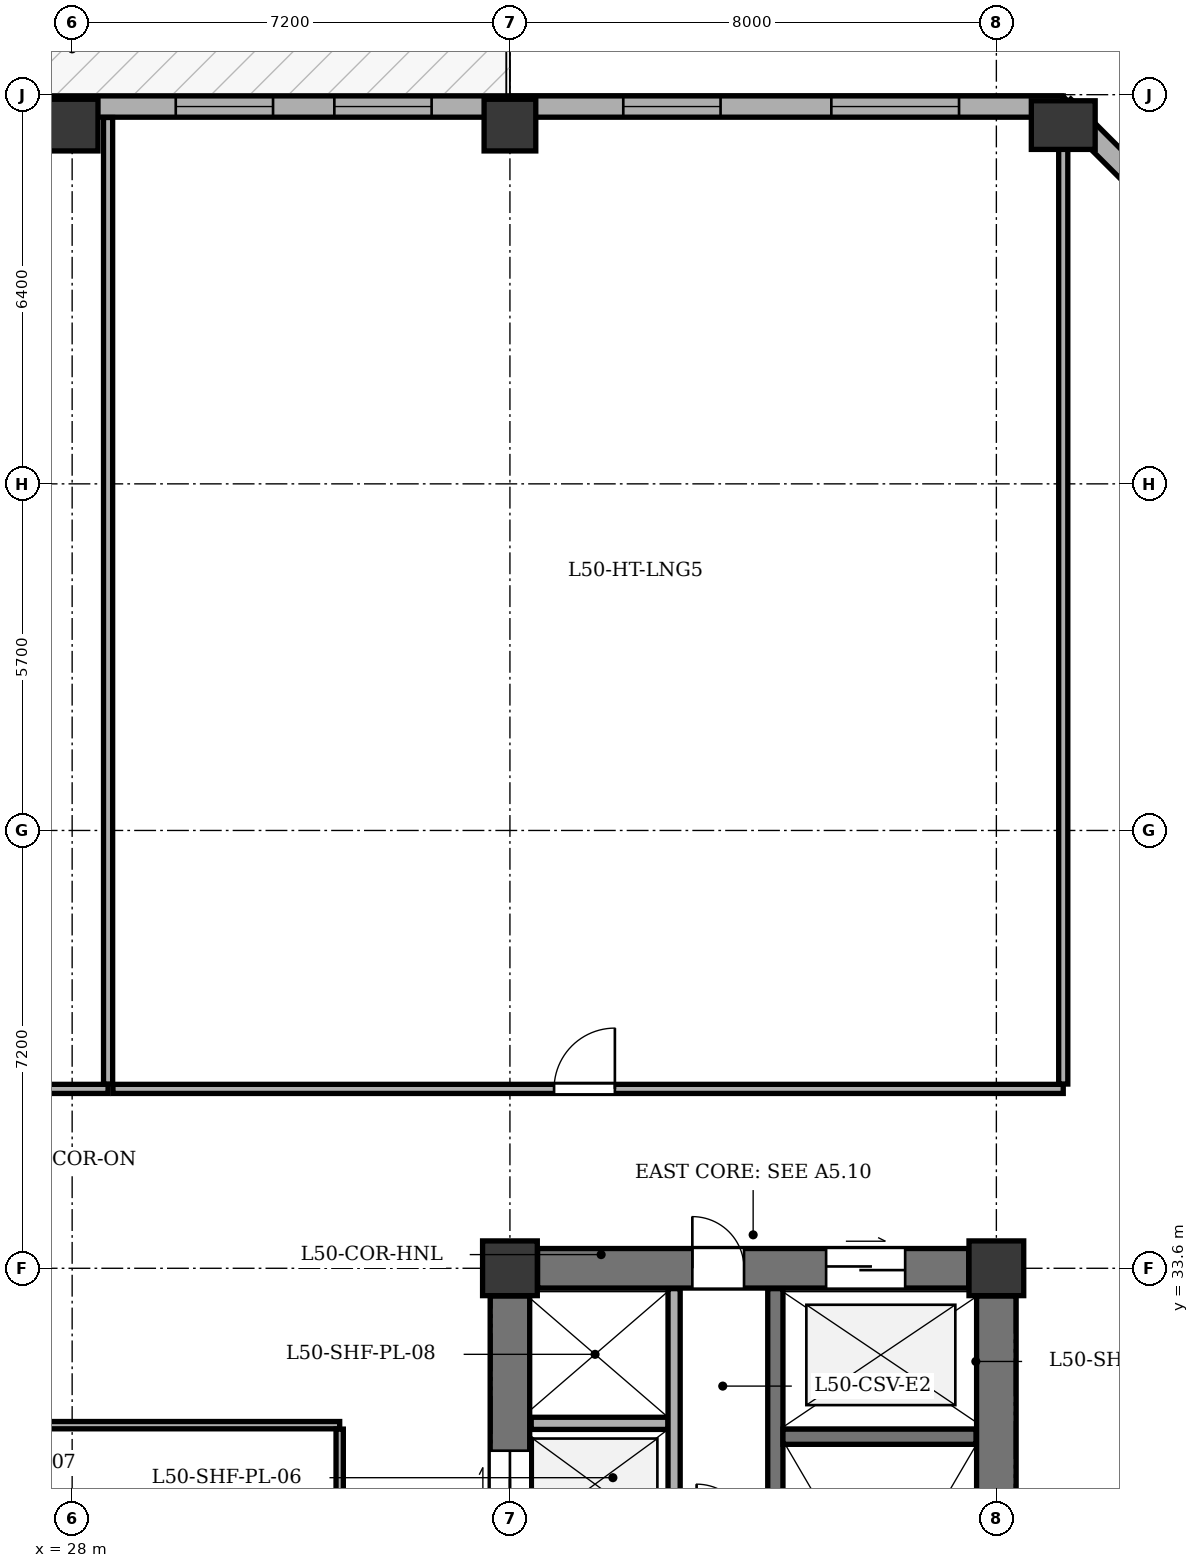
"""IFC4 building model, lengths in metres.
Left out: names, types, materials, properties, quantities, classifications, styles, units other than length and angle.
Written with IfcOpenShell. Run it as: python <this file> out.ifc"""

import sys

from ifc_helpers import new_model, si_unit, direction, frame, frame_2d, origin, origin_2d, place, context, subcontext, project, spatial, rectangle, extrude, element, fill, save


model = new_model("IFC4")
c1 = context("Model", 3, precision=1e-05, world=origin(), true_north=direction((0.0, 1.0)))
c2 = subcontext(c1, "Body", "Model", "MODEL_VIEW")
j1 = project(units=[si_unit("LENGTHUNIT", "METRE"), si_unit("PLANEANGLEUNIT", "RADIAN")], contexts=[c1])
p1 = place(None, origin())
s1 = spatial("IfcSite", under=j1, at=p1, CompositionType="ELEMENT")
p2 = place(p1, origin())
s2 = spatial("IfcBuilding", under=s1, at=p2, CompositionType="ELEMENT")
p3 = place(p2, frame((0.0, 0.0, 193.8)))
s3 = spatial("IfcBuildingStorey", under=s2, at=p3, CompositionType="ELEMENT", Elevation=193.8)
for number, where, z_axis, x_axis in (
    (1, (35.2, 33.6, 0.0), (0.0, 0.0, 1.0), (1.0, 0.0, 0.0)),
    (2, (43.2, 33.6, 0.0), (0.0, 0.0, 1.0), (1.0, 0.0, 0.0)),
):
    element("IfcColumn", number, at=place(p3, frame(where, z_axis=z_axis, x_axis=x_axis)), inside=s3, PredefinedType="COLUMN", context=c2, shape_type="SweptSolid", body=[
        extrude(rectangle(XDim=0.9, YDim=0.9, at=origin_2d()), origin(), (0.0, 0.0, 1.0), 3.5),
    ])
for number, where, z_axis, x_axis in (
    (3, (28.0, 52.4, 0.0), (0.0, 0.0, 1.0), (1.0, 0.0, 0.0)),
    (4, (35.2, 52.4, 0.0), (0.0, 0.0, 1.0), (1.0, 0.0, 0.0)),
):
    element("IfcColumn", number, at=place(p3, frame(where, z_axis=z_axis, x_axis=x_axis)), inside=s3, PredefinedType="COLUMN", context=c2, shape_type="SweptSolid", body=[
        extrude(rectangle(XDim=0.85, YDim=0.85, at=origin_2d()), origin(), (0.0, 0.0, 1.0), 3.5),
    ])
p4 = place(p3, frame((44.3, 52.4, 0.0), z_axis=(0.0, 0.0, 1.0), x_axis=(1.0, 0.0, 0.0)))
e5 = element("IfcColumn", 5, at=p4, inside=s3, PredefinedType="COLUMN", context=c2, shape_type="SweptSolid", body=[
    extrude(rectangle(XDim=0.8, YDim=1.05, at=origin_2d()), origin(), (0.0, 0.0, 1.0), 3.5),
])
p5 = place(p3, frame((9.3, 52.705, 0.0), z_axis=(0.0, 0.0, 1.0), x_axis=(1.0, 0.0, 0.0)))
e6 = element("IfcWall", 6, at=p5, inside=s3, PredefinedType="STANDARD", context=c2, shape_type="SweptSolid", body=[
    extrude(rectangle(XDim=35.0, YDim=0.35, at=frame_2d((17.5, 0.0))), origin(), (0.0, 0.0, 1.0), 2.635),
])
p6 = place(p5, frame((14.4, 0.0, 0.0)))
e7 = element("IfcOpeningElement", 7, at=p6, cuts=e6, PredefinedType="OPENING", context=c2, shape_type="SweptSolid", body=[
    extrude(rectangle(XDim=1.0, YDim=2.02, at=frame_2d((0.5, 1.01))), frame((0.0, 0.185, 0.0), z_axis=(0.0, -1.0, 0.0), x_axis=(1.0, 0.0, 0.0)), (0.0, 0.0, 1.0), 0.37),
])
p7 = place(p5, frame((2.687, 0.0, 0.75)))
e8 = element("IfcOpeningElement", 8, at=p7, cuts=e6, PredefinedType="OPENING", context=c2, shape_type="SweptSolid", body=[
    extrude(rectangle(XDim=1.6, YDim=1.75, at=frame_2d((0.8, 0.875))), frame((0.0, 0.185, 0.0), z_axis=(0.0, -1.0, 0.0), x_axis=(1.0, 0.0, 0.0)), (0.0, 0.0, 1.0), 0.37),
])
p8 = place(p5, frame((6.383, 0.0, 0.75)))
e9 = element("IfcOpeningElement", 9, at=p8, cuts=e6, PredefinedType="OPENING", context=c2, shape_type="SweptSolid", body=[
    extrude(rectangle(XDim=2.1, YDim=1.75, at=frame_2d((1.05, 0.875))), frame((0.0, 0.185, 0.0), z_axis=(0.0, -1.0, 0.0), x_axis=(1.0, 0.0, 0.0)), (0.0, 0.0, 1.0), 0.37),
])
p9 = place(p5, frame((20.404, 0.0, 0.75)))
e10 = element("IfcOpeningElement", 10, at=p9, cuts=e6, PredefinedType="OPENING", context=c2, shape_type="SweptSolid", body=[
    extrude(rectangle(XDim=1.6, YDim=1.75, at=frame_2d((0.8, 0.875))), frame((0.0, 0.185, 0.0), z_axis=(0.0, -1.0, 0.0), x_axis=(1.0, 0.0, 0.0)), (0.0, 0.0, 1.0), 0.37),
])
p10 = place(p5, frame((23.012, 0.0, 0.75)))
e11 = element("IfcOpeningElement", 11, at=p10, cuts=e6, PredefinedType="OPENING", context=c2, shape_type="SweptSolid", body=[
    extrude(rectangle(XDim=1.6, YDim=1.75, at=frame_2d((0.8, 0.875))), frame((0.0, 0.185, 0.0), z_axis=(0.0, -1.0, 0.0), x_axis=(1.0, 0.0, 0.0)), (0.0, 0.0, 1.0), 0.37),
])
p11 = place(p5, frame((27.764, 0.0, 0.75)))
e12 = element("IfcOpeningElement", 12, at=p11, cuts=e6, PredefinedType="OPENING", context=c2, shape_type="SweptSolid", body=[
    extrude(rectangle(XDim=1.6, YDim=1.75, at=frame_2d((0.8, 0.875))), frame((0.0, 0.185, 0.0), z_axis=(0.0, -1.0, 0.0), x_axis=(1.0, 0.0, 0.0)), (0.0, 0.0, 1.0), 0.37),
])
p12 = place(p5, frame((31.186, 0.0, 0.75)))
e13 = element("IfcOpeningElement", 13, at=p12, cuts=e6, PredefinedType="OPENING", context=c2, shape_type="SweptSolid", body=[
    extrude(rectangle(XDim=2.1, YDim=1.75, at=frame_2d((1.05, 0.875))), frame((0.0, 0.185, 0.0), z_axis=(0.0, -1.0, 0.0), x_axis=(1.0, 0.0, 0.0)), (0.0, 0.0, 1.0), 0.37),
])
p13 = place(p3, frame((44.3, 52.705, 0.0), z_axis=(0.0, 0.0, 1.0), x_axis=(0.707088817216, -0.7071247447, 0.0)))
e14 = element("IfcWall", 14, at=p13, inside=s3, PredefinedType="STANDARD", context=c2, shape_type="SweptSolid", body=[
    extrude(rectangle(XDim=6.795, YDim=0.35, at=frame_2d((3.398, 0.0))), origin(), (0.0, 0.0, 1.0), 2.635),
])
p14 = place(p13, frame((2.698, 0.0, 0.75)))
e15 = element("IfcOpeningElement", 15, at=p14, cuts=e14, PredefinedType="OPENING", context=c2, shape_type="SweptSolid", body=[
    extrude(rectangle(XDim=1.4, YDim=1.65, at=frame_2d((0.7, 0.825))), frame((0.0, 0.185, 0.0), z_axis=(0.0, -1.0, 0.0), x_axis=(1.0, 0.0, 0.0)), (0.0, 0.0, 1.0), 0.37),
])
p15 = place(p3, frame((43.2, 21.255, 0.0), z_axis=(0.0, 0.0, 1.0), x_axis=(0.0, 1.0, 0.0)))
e16 = element("IfcWall", 16, at=p15, inside=s3, PredefinedType="SHEAR", context=c2, shape_type="SweptSolid", body=[
    extrude(rectangle(XDim=11.89, YDim=0.65, at=frame_2d((5.945, 0.0))), origin(), (0.0, 0.0, 1.0), 3.05),
])
p16 = place(p3, frame((35.655, 33.6, 0.0), z_axis=(0.0, 0.0, 1.0), x_axis=(1.0, 0.0, 0.0)))
e17 = element("IfcWall", 17, at=p16, inside=s3, PredefinedType="SHEAR", context=c2, shape_type="SweptSolid", body=[
    extrude(rectangle(XDim=7.09, YDim=0.65, at=frame_2d((3.545, 0.0))), origin(), (0.0, 0.0, 1.0), 3.05),
])
p17 = place(p16, frame((4.745, 0.0, 0.0)))
e18 = element("IfcOpeningElement", 18, at=p17, cuts=e17, PredefinedType="OPENING", context=c2, shape_type="SweptSolid", body=[
    extrude(rectangle(XDim=1.3, YDim=2.15, at=frame_2d((0.65, 1.075))), frame((0.0, 0.335, 0.0), z_axis=(0.0, -1.0, 0.0), x_axis=(1.0, 0.0, 0.0)), (0.0, 0.0, 1.0), 0.67),
])
p18 = place(p16, frame((2.545, 0.0, 0.0)))
e19 = element("IfcOpeningElement", 19, at=p18, cuts=e17, PredefinedType="OPENING", context=c2, shape_type="SweptSolid", body=[
    extrude(rectangle(XDim=0.85, YDim=2.02, at=frame_2d((0.425, 1.01))), frame((0.0, 0.335, 0.0), z_axis=(0.0, -1.0, 0.0), x_axis=(1.0, 0.0, 0.0)), (0.0, 0.0, 1.0), 0.67),
])
p19 = place(p3, frame((35.2, 21.255, 0.0), z_axis=(0.0, 0.0, 1.0), x_axis=(0.0, 1.0, 0.0)))
e20 = element("IfcWall", 20, at=p19, inside=s3, PredefinedType="SHEAR", context=c2, shape_type="SweptSolid", body=[
    extrude(rectangle(XDim=11.89, YDim=0.65, at=frame_2d((5.945, 0.0))), origin(), (0.0, 0.0, 1.0), 3.05),
])
p20 = place(p19, frame((1.345, 0.0, 0.0)))
e21 = element("IfcOpeningElement", 21, at=p20, cuts=e20, PredefinedType="OPENING", context=c2, shape_type="SweptSolid", body=[
    extrude(rectangle(XDim=1.2, YDim=2.15, at=frame_2d((0.6, 1.075))), frame((0.0, 0.335, 0.0), z_axis=(0.0, -1.0, 0.0), x_axis=(1.0, 0.0, 0.0)), (0.0, 0.0, 1.0), 0.67),
])
p21 = place(p19, frame((4.345, 0.0, 0.0)))
e22 = element("IfcOpeningElement", 22, at=p21, cuts=e20, PredefinedType="OPENING", context=c2, shape_type="SweptSolid", body=[
    extrude(rectangle(XDim=1.1, YDim=2.1, at=frame_2d((0.55, 1.05))), frame((0.0, 0.335, 0.0), z_axis=(0.0, -1.0, 0.0), x_axis=(1.0, 0.0, 0.0)), (0.0, 0.0, 1.0), 0.67),
])
p22 = place(p19, frame((6.295, 0.0, 0.0)))
e23 = element("IfcOpeningElement", 23, at=p22, cuts=e20, PredefinedType="OPENING", context=c2, shape_type="SweptSolid", body=[
    extrude(rectangle(XDim=1.1, YDim=2.1, at=frame_2d((0.55, 1.05))), frame((0.0, 0.335, 0.0), z_axis=(0.0, -1.0, 0.0), x_axis=(1.0, 0.0, 0.0)), (0.0, 0.0, 1.0), 0.67),
])
p23 = place(p19, frame((8.245, 0.0, 0.0)))
e24 = element("IfcOpeningElement", 24, at=p23, cuts=e20, PredefinedType="OPENING", context=c2, shape_type="SweptSolid", body=[
    extrude(rectangle(XDim=1.1, YDim=2.1, at=frame_2d((0.55, 1.05))), frame((0.0, 0.335, 0.0), z_axis=(0.0, -1.0, 0.0), x_axis=(1.0, 0.0, 0.0)), (0.0, 0.0, 1.0), 0.67),
])
p24 = place(p3, frame((39.565, 21.135, 0.0), z_axis=(0.0, 0.0, 1.0), x_axis=(0.0, 1.0, 0.0)))
e25 = element("IfcWall", 25, at=p24, inside=s3, PredefinedType="SHEAR", context=c2, shape_type="SweptSolid", body=[
    extrude(rectangle(XDim=12.13, YDim=0.25, at=frame_2d((6.065, 0.0))), origin(), (0.0, 0.0, 1.0), 3.05),
])
p25 = place(p24, frame((0.515, 0.0, 0.0)))
e26 = element("IfcOpeningElement", 26, at=p25, cuts=e25, PredefinedType="OPENING", context=c2, shape_type="SweptSolid", body=[
    extrude(rectangle(XDim=1.2, YDim=2.15, at=frame_2d((0.6, 1.075))), frame((0.0, 0.135, 0.0), z_axis=(0.0, -1.0, 0.0), x_axis=(1.0, 0.0, 0.0)), (0.0, 0.0, 1.0), 0.27),
])
p26 = place(p24, frame((2.665, 0.0, 0.0)))
e27 = element("IfcOpeningElement", 27, at=p26, cuts=e25, PredefinedType="OPENING", context=c2, shape_type="SweptSolid", body=[
    extrude(rectangle(XDim=1.15, YDim=2.15, at=frame_2d((0.575, 1.075))), frame((0.0, 0.135, 0.0), z_axis=(0.0, -1.0, 0.0), x_axis=(1.0, 0.0, 0.0)), (0.0, 0.0, 1.0), 0.27),
])
p27 = place(p3, frame((39.69, 30.83, 0.0), z_axis=(0.0, 0.0, 1.0), x_axis=(1.0, 0.0, 0.0)))
e28 = element("IfcWall", 28, at=p27, inside=s3, PredefinedType="SHEAR", context=c2, shape_type="SweptSolid", body=[
    extrude(rectangle(XDim=3.175, YDim=0.25, at=frame_2d((1.587, 0.0))), origin(), (0.0, 0.0, 1.0), 3.05),
])
p28 = place(p3, frame((35.55, 31.05, 0.0), z_axis=(0.0, 0.0, 1.0), x_axis=(1.0, 0.0, 0.0)))
e29 = element("IfcWall", 29, at=p28, inside=s3, PredefinedType="SOLIDWALL", context=c2, shape_type="SweptSolid", body=[
    extrude(rectangle(XDim=2.25, YDim=0.2, at=frame_2d((1.125, 0.0))), origin(), (0.0, 0.0, 1.0), 3.05),
])
p29 = place(p3, frame((37.9, 25.27, 0.0), z_axis=(0.0, 0.0, 1.0), x_axis=(0.0, 1.0, 0.0)))
e30 = element("IfcWall", 30, at=p29, inside=s3, PredefinedType="SOLIDWALL", context=c2, shape_type="SweptSolid", body=[
    extrude(rectangle(XDim=7.995, YDim=0.2, at=frame_2d((3.998, 0.0))), origin(), (0.0, 0.0, 1.0), 3.05),
])
p30 = place(p3, frame((20.46, 31.02, 0.0), z_axis=(0.0, 0.0, 1.0), x_axis=(1.0, 0.0, 0.0)))
e31 = element("IfcWall", 31, at=p30, inside=s3, PredefinedType="PARTITIONING", context=c2, shape_type="SweptSolid", body=[
    extrude(rectangle(XDim=11.94, YDim=0.12, at=frame_2d((5.97, 0.0))), origin(), (0.0, 0.0, 1.0), 3.05),
])
p31 = place(p3, frame((32.4, 25.285, 0.0), z_axis=(0.0, 0.0, 1.0), x_axis=(0.0, 1.0, 0.0)))
e32 = element("IfcWall", 32, at=p31, inside=s3, PredefinedType="PARTITIONING", context=c2, shape_type="SweptSolid", body=[
    extrude(rectangle(XDim=5.67, YDim=0.12, at=frame_2d((2.835, 0.0))), origin(), (0.0, 0.0, 1.0), 3.05),
])
p32 = place(p31, frame((2.135, 0.0, 0.0)))
e33 = element("IfcOpeningElement", 33, at=p32, cuts=e32, PredefinedType="OPENING", context=c2, shape_type="SweptSolid", body=[
    extrude(rectangle(XDim=0.95, YDim=2.1, at=frame_2d((0.475, 1.05))), frame((0.0, 0.07, 0.0), z_axis=(0.0, -1.0, 0.0), x_axis=(1.0, 0.0, 0.0)), (0.0, 0.0, 1.0), 0.14),
])
p33 = place(p3, frame((21.27, 36.55, 0.0), z_axis=(0.0, 0.0, 1.0), x_axis=(1.0, 0.0, 0.0)))
e34 = element("IfcWall", 34, at=p33, inside=s3, PredefinedType="PARTITIONING", context=c2, shape_type="SweptSolid", body=[
    extrude(rectangle(XDim=7.321, YDim=0.15, at=frame_2d((3.661, 0.0))), origin(), (0.0, 0.0, 1.0), 3.05),
])
p34 = place(p33, frame((3.18, 0.0, 0.0)))
e35 = element("IfcOpeningElement", 35, at=p34, cuts=e34, PredefinedType="OPENING", context=c2, shape_type="SweptSolid", body=[
    extrude(rectangle(XDim=0.95, YDim=2.1, at=frame_2d((0.475, 1.05))), frame((0.0, 0.085, 0.0), z_axis=(0.0, -1.0, 0.0), x_axis=(1.0, 0.0, 0.0)), (0.0, 0.0, 1.0), 0.17),
])
p35 = place(p3, frame((28.591, 36.63, 0.0), z_axis=(0.0, 0.0, 1.0), x_axis=(0.0, 1.0, 0.0)))
e36 = element("IfcWall", 36, at=p35, inside=s3, PredefinedType="PARTITIONING", context=c2, shape_type="SweptSolid", body=[
    extrude(rectangle(XDim=15.895, YDim=0.15, at=frame_2d((7.948, 0.0))), origin(), (0.0, 0.0, 1.0), 3.05),
])
p36 = place(p3, frame((28.671, 36.55, 0.0), z_axis=(0.0, 0.0, 1.0), x_axis=(1.0, 0.0, 0.0)))
e37 = element("IfcWall", 37, at=p36, inside=s3, PredefinedType="PARTITIONING", context=c2, shape_type="SweptSolid", body=[
    extrude(rectangle(XDim=15.629, YDim=0.15, at=frame_2d((7.814, 0.0))), origin(), (0.0, 0.0, 1.0), 3.05),
])
p37 = place(p36, frame((7.255, 0.0, 0.0)))
e38 = element("IfcOpeningElement", 38, at=p37, cuts=e37, PredefinedType="OPENING", context=c2, shape_type="SweptSolid", body=[
    extrude(rectangle(XDim=1.0, YDim=2.1, at=frame_2d((0.5, 1.05))), frame((0.0, 0.085, 0.0), z_axis=(0.0, -1.0, 0.0), x_axis=(1.0, 0.0, 0.0)), (0.0, 0.0, 1.0), 0.17),
])
p38 = place(p3, frame((44.3, 36.63, 0.0), z_axis=(0.0, 0.0, 1.0), x_axis=(0.0, 1.0, 0.0)))
e39 = element("IfcWall", 39, at=p38, inside=s3, PredefinedType="PARTITIONING", context=c2, shape_type="SweptSolid", body=[
    extrude(rectangle(XDim=15.895, YDim=0.15, at=frame_2d((7.948, 0.0))), origin(), (0.0, 0.0, 1.0), 3.05),
])
p39 = place(p9, origin())
e40 = element("IfcWindow", 40, at=p39, inside=s3, PartitioningType="SINGLE_PANEL", PredefinedType="WINDOW", context=c2, shape_type="SweptSolid", body=[
    extrude(rectangle(XDim=1.6, YDim=1.75, at=frame_2d((0.8, 0.875))), frame((0.0, -0.01, 0.0), z_axis=(0.0, -1.0, 0.0), x_axis=(1.0, 0.0, 0.0)), (0.0, 0.0, 1.0), 0.06),
])
fill(e10, e40)
p40 = place(p10, origin())
e41 = element("IfcWindow", 41, at=p40, inside=s3, PartitioningType="SINGLE_PANEL", PredefinedType="WINDOW", context=c2, shape_type="SweptSolid", body=[
    extrude(rectangle(XDim=1.6, YDim=1.75, at=frame_2d((0.8, 0.875))), frame((0.0, -0.01, 0.0), z_axis=(0.0, -1.0, 0.0), x_axis=(1.0, 0.0, 0.0)), (0.0, 0.0, 1.0), 0.06),
])
fill(e11, e41)
p41 = place(p11, origin())
e42 = element("IfcWindow", 42, at=p41, inside=s3, PartitioningType="SINGLE_PANEL", PredefinedType="WINDOW", context=c2, shape_type="SweptSolid", body=[
    extrude(rectangle(XDim=1.6, YDim=1.75, at=frame_2d((0.8, 0.875))), frame((0.0, -0.01, 0.0), z_axis=(0.0, -1.0, 0.0), x_axis=(1.0, 0.0, 0.0)), (0.0, 0.0, 1.0), 0.06),
])
fill(e12, e42)
p42 = place(p12, origin())
e43 = element("IfcWindow", 43, at=p42, inside=s3, PartitioningType="SINGLE_PANEL", PredefinedType="WINDOW", context=c2, shape_type="SweptSolid", body=[
    extrude(rectangle(XDim=2.1, YDim=1.75, at=frame_2d((1.05, 0.875))), frame((0.0, -0.01, 0.0), z_axis=(0.0, -1.0, 0.0), x_axis=(1.0, 0.0, 0.0)), (0.0, 0.0, 1.0), 0.06),
])
fill(e13, e43)
p43 = place(p17, origin())
e44 = element("IfcDoor", 44, at=p43, inside=s3, OperationType="DOUBLE_DOOR_SLIDING", PredefinedType="DOOR", context=c2, shape_type="SweptSolid", body=[
    extrude(rectangle(XDim=1.3, YDim=2.15, at=frame_2d((0.65, 1.075))), frame((0.0, 0.025, 0.0), z_axis=(0.0, -1.0, 0.0), x_axis=(1.0, 0.0, 0.0)), (0.0, 0.0, 1.0), 0.05),
])
fill(e18, e44)
p44 = place(p18, origin())
e45 = element("IfcDoor", 45, at=p44, inside=s3, OperationType="SINGLE_SWING_LEFT", PredefinedType="DOOR", context=c2, shape_type="SweptSolid", body=[
    extrude(rectangle(XDim=0.85, YDim=2.02, at=frame_2d((0.425, 1.01))), frame((0.0, 0.025, 0.0), z_axis=(0.0, -1.0, 0.0), x_axis=(1.0, 0.0, 0.0)), (0.0, 0.0, 1.0), 0.05),
])
fill(e19, e45)
p45 = place(p23, origin())
e46 = element("IfcDoor", 46, at=p45, inside=s3, OperationType="DOUBLE_DOOR_SLIDING", PredefinedType="DOOR", context=c2, shape_type="SweptSolid", body=[
    extrude(rectangle(XDim=1.1, YDim=2.1, at=frame_2d((0.55, 1.05))), frame((0.0, 0.025, 0.0), z_axis=(0.0, -1.0, 0.0), x_axis=(1.0, 0.0, 0.0)), (0.0, 0.0, 1.0), 0.05),
])
fill(e24, e46)
p46 = place(p37, origin())
e47 = element("IfcDoor", 47, at=p46, inside=s3, OperationType="SINGLE_SWING_RIGHT", PredefinedType="DOOR", context=c2, shape_type="SweptSolid", body=[
    extrude(rectangle(XDim=1.0, YDim=2.1, at=frame_2d((0.5, 1.05))), frame((0.0, 0.025, 0.0), z_axis=(0.0, -1.0, 0.0), x_axis=(1.0, 0.0, 0.0)), (0.0, 0.0, 1.0), 0.05),
])
fill(e38, e47)
save(model, sys.argv[1])
